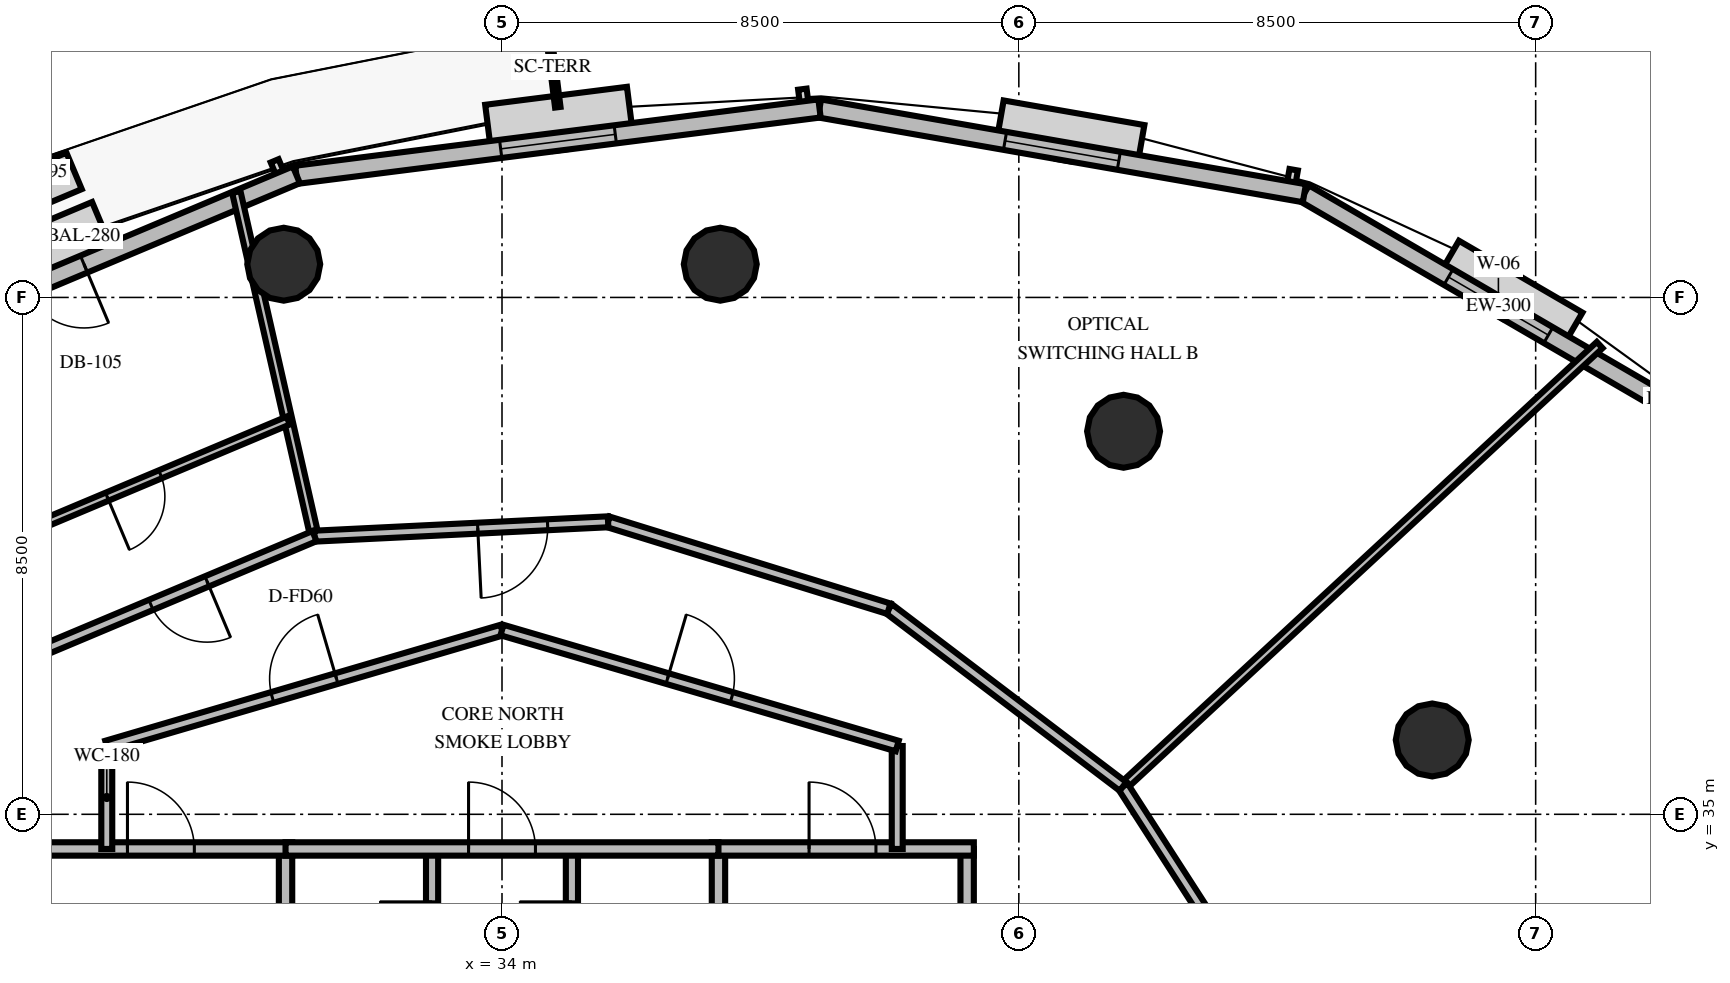
"""IFC4 building model, lengths in metres.
Left out: names, types, materials, properties, quantities, classifications, styles, units other than length and angle.
Written with IfcOpenShell. Run it as: python <this file> out.ifc"""

import sys

from ifc_helpers import new_model, si_unit, direction, frame, frame_2d, origin, origin_2d, place, context, subcontext, project, spatial, rectangle, circle, extrude, element, fill, save


model = new_model("IFC4")
c1 = context("Model", 3, precision=1e-05, world=origin(), true_north=direction((0.0, 1.0)))
c2 = subcontext(c1, "Body", "Model", "MODEL_VIEW")
j1 = project(units=[si_unit("LENGTHUNIT", "METRE"), si_unit("PLANEANGLEUNIT", "RADIAN")], contexts=[c1])
p1 = place(None, origin())
s1 = spatial("IfcSite", under=j1, at=p1, CompositionType="ELEMENT")
p2 = place(p1, origin())
s2 = spatial("IfcBuilding", under=s1, at=p2, CompositionType="ELEMENT")
p3 = place(p2, frame((0.0, 0.0, 129.8)))
s3 = spatial("IfcBuildingStorey", under=s2, at=p3, CompositionType="ELEMENT", Elevation=129.8)
for number, where, z_axis, x_axis in (
    (1, (49.299, 36.222, 0.0), (0.0, 0.0, 1.0), (1.0, 0.0, 0.0)),
    (2, (44.222, 41.299, 0.0), (0.0, 0.0, 1.0), (1.0, 0.0, 0.0)),
    (3, (37.59, 44.046, 0.0), (0.0, 0.0, 1.0), (1.0, 0.0, 0.0)),
    (4, (30.41, 44.046, 0.0), (0.0, 0.0, 1.0), (1.0, 0.0, 0.0)),
):
    element("IfcColumn", number, at=place(p3, frame(where, z_axis=z_axis, x_axis=x_axis)), inside=s3, PredefinedType="COLUMN", context=c2, shape_type="SweptSolid", body=[
        extrude(circle(Radius=0.6, at=origin_2d()), origin(), (0.0, 0.0, 1.0), 4.0),
    ])
p4 = place(p3, frame((53.579, 41.502, 0.0), z_axis=(0.0, 0.0, 1.0), x_axis=(-0.864447367907, 0.502723331585, 0.0)))
e5 = element("IfcWall", 5, at=p4, inside=s3, PredefinedType="SOLIDWALL", context=c2, shape_type="SweptSolid", body=[
    extrude(rectangle(XDim=7.383, YDim=0.3, at=frame_2d((3.691, 0.0))), origin(), (0.0, 0.0, 1.0), 2.9),
])
p5 = place(p4, frame((2.742, 0.0, 0.8)))
e6 = element("IfcOpeningElement", 6, at=p5, cuts=e5, PredefinedType="OPENING", context=c2, shape_type="SweptSolid", body=[
    extrude(rectangle(XDim=1.9, YDim=1.95, at=frame_2d((0.95, 0.975))), frame((0.0, 0.16, 0.0), z_axis=(0.0, -1.0, 0.0), x_axis=(1.0, 0.0, 0.0)), (0.0, 0.0, 1.0), 0.32),
])
p6 = place(p3, frame((47.196, 45.214, 0.0), z_axis=(0.0, 0.0, 1.0), x_axis=(-0.985055293806, 0.172238404964, 0.0)))
e7 = element("IfcWall", 7, at=p6, inside=s3, PredefinedType="SOLIDWALL", context=c2, shape_type="SweptSolid", body=[
    extrude(rectangle(XDim=8.095, YDim=0.3, at=frame_2d((4.048, 0.0))), origin(), (0.0, 0.0, 1.0), 2.9),
])
p7 = place(p6, frame((3.098, 0.0, 0.8)))
e8 = element("IfcOpeningElement", 8, at=p7, cuts=e7, PredefinedType="OPENING", context=c2, shape_type="SweptSolid", body=[
    extrude(rectangle(XDim=1.9, YDim=1.95, at=frame_2d((0.95, 0.975))), frame((0.0, 0.16, 0.0), z_axis=(0.0, -1.0, 0.0), x_axis=(1.0, 0.0, 0.0)), (0.0, 0.0, 1.0), 0.32),
])
p8 = place(p3, frame((39.222, 46.608, 0.0), z_axis=(0.0, 0.0, 1.0), x_axis=(-0.992051922293, -0.12582918372, 0.0)))
e9 = element("IfcWall", 9, at=p8, inside=s3, PredefinedType="SOLIDWALL", context=c2, shape_type="SweptSolid", body=[
    extrude(rectangle(XDim=8.673, YDim=0.3, at=frame_2d((4.336, 0.0))), origin(), (0.0, 0.0, 1.0), 2.9),
])
p9 = place(p8, frame((3.386, 0.0, 0.8)))
e10 = element("IfcOpeningElement", 10, at=p9, cuts=e9, PredefinedType="OPENING", context=c2, shape_type="SweptSolid", body=[
    extrude(rectangle(XDim=1.9, YDim=1.95, at=frame_2d((0.95, 0.975))), frame((0.0, 0.16, 0.0), z_axis=(0.0, -1.0, 0.0), x_axis=(1.0, 0.0, 0.0)), (0.0, 0.0, 1.0), 0.32),
])
p10 = place(p3, frame((30.618, 45.517, 0.0), z_axis=(0.0, 0.0, 1.0), x_axis=(-0.921862650999, -0.387516777305, 0.0)))
e11 = element("IfcWall", 11, at=p10, inside=s3, PredefinedType="SOLIDWALL", context=c2, shape_type="SweptSolid", body=[
    extrude(rectangle(XDim=8.891, YDim=0.3, at=frame_2d((4.445, 0.0))), origin(), (0.0, 0.0, 1.0), 2.9),
])
p11 = place(p10, frame((3.79, 0.0, 0.0)))
e12 = element("IfcOpeningElement", 12, at=p11, cuts=e11, PredefinedType="OPENING", context=c2, shape_type="SweptSolid", body=[
    extrude(rectangle(XDim=1.05, YDim=2.15, at=frame_2d((0.525, 1.075))), frame((0.0, 0.16, 0.0), z_axis=(0.0, -1.0, 0.0), x_axis=(1.0, 0.0, 0.0)), (0.0, 0.0, 1.0), 0.32),
])
p12 = place(p3, frame((30.44, 30.05, 0.0), z_axis=(0.0, 0.0, 1.0), x_axis=(0.0, 1.0, 0.0)))
e13 = element("IfcWall", 13, at=p12, inside=s3, PredefinedType="SOLIDWALL", context=c2, shape_type="SweptSolid", body=[
    extrude(rectangle(XDim=4.38, YDim=0.22, at=frame_2d((2.19, 0.0))), origin(), (0.0, 0.0, 1.0), 2.8),
])
p13 = place(p12, frame((0.8, 0.0, 0.0)))
e14 = element("IfcOpeningElement", 14, at=p13, cuts=e13, PredefinedType="OPENING", context=c2, shape_type="SweptSolid", body=[
    extrude(rectangle(XDim=1.05, YDim=2.1, at=frame_2d((0.525, 1.05))), frame((0.0, 0.12, 0.0), z_axis=(0.0, -1.0, 0.0), x_axis=(1.0, 0.0, 0.0)), (0.0, 0.0, 1.0), 0.24),
])
p14 = place(p3, frame((26.24, 34.43, 0.0), z_axis=(0.0, 0.0, 1.0), x_axis=(1.0, 0.0, 0.0)))
e15 = element("IfcWall", 15, at=p14, inside=s3, PredefinedType="SOLIDWALL", context=c2, shape_type="SweptSolid", body=[
    extrude(rectangle(XDim=4.31, YDim=0.22, at=frame_2d((2.155, 0.0))), origin(), (0.0, 0.0, 1.0), 2.8),
])
p15 = place(p14, frame((1.6, 0.0, 0.0)))
e16 = element("IfcOpeningElement", 16, at=p15, cuts=e15, PredefinedType="OPENING", context=c2, shape_type="SweptSolid", body=[
    extrude(rectangle(XDim=1.1, YDim=2.15, at=frame_2d((0.55, 1.075))), frame((0.0, 0.12, 0.0), z_axis=(0.0, -1.0, 0.0), x_axis=(1.0, 0.0, 0.0)), (0.0, 0.0, 1.0), 0.24),
])
p16 = place(p3, frame((32.85, 30.05, 0.0), z_axis=(0.0, 0.0, 1.0), x_axis=(0.0, 1.0, 0.0)))
e17 = element("IfcWall", 17, at=p16, inside=s3, PredefinedType="SOLIDWALL", context=c2, shape_type="SweptSolid", body=[
    extrude(rectangle(XDim=4.38, YDim=0.2, at=frame_2d((2.19, 0.0))), origin(), (0.0, 0.0, 1.0), 2.8),
])
p17 = place(p16, frame((2.65, 0.0, 0.0)))
e18 = element("IfcOpeningElement", 18, at=p17, cuts=e17, PredefinedType="OPENING", context=c2, shape_type="SweptSolid", body=[
    extrude(rectangle(XDim=0.86, YDim=2.05, at=frame_2d((0.43, 1.025))), frame((0.0, 0.11, 0.0), z_axis=(0.0, -1.0, 0.0), x_axis=(1.0, 0.0, 0.0)), (0.0, 0.0, 1.0), 0.22),
])
p18 = place(p3, frame((37.56, 30.05, 0.0), z_axis=(0.0, 0.0, 1.0), x_axis=(0.0, 1.0, 0.0)))
e19 = element("IfcWall", 19, at=p18, inside=s3, PredefinedType="SOLIDWALL", context=c2, shape_type="SweptSolid", body=[
    extrude(rectangle(XDim=4.38, YDim=0.22, at=frame_2d((2.19, 0.0))), origin(), (0.0, 0.0, 1.0), 2.8),
])
p19 = place(p18, frame((0.8, 0.0, 0.0)))
e20 = element("IfcOpeningElement", 20, at=p19, cuts=e19, PredefinedType="OPENING", context=c2, shape_type="SweptSolid", body=[
    extrude(rectangle(XDim=1.05, YDim=2.1, at=frame_2d((0.525, 1.05))), frame((0.0, 0.12, 0.0), z_axis=(0.0, -1.0, 0.0), x_axis=(1.0, 0.0, 0.0)), (0.0, 0.0, 1.0), 0.24),
])
p20 = place(p3, frame((41.65, 30.05, 0.0), z_axis=(0.0, 0.0, 1.0), x_axis=(0.0, 1.0, 0.0)))
e21 = element("IfcWall", 21, at=p20, inside=s3, PredefinedType="SOLIDWALL", context=c2, shape_type="SweptSolid", body=[
    extrude(rectangle(XDim=4.38, YDim=0.22, at=frame_2d((2.19, 0.0))), origin(), (0.0, 0.0, 1.0), 2.8),
])
p21 = place(p3, frame((37.45, 34.43, 0.0), z_axis=(0.0, 0.0, 1.0), x_axis=(1.0, 0.0, 0.0)))
e22 = element("IfcWall", 22, at=p21, inside=s3, PredefinedType="SOLIDWALL", context=c2, shape_type="SweptSolid", body=[
    extrude(rectangle(XDim=4.31, YDim=0.22, at=frame_2d((2.155, 0.0))), origin(), (0.0, 0.0, 1.0), 2.8),
])
p22 = place(p21, frame((1.6, 0.0, 0.0)))
e23 = element("IfcOpeningElement", 23, at=p22, cuts=e22, PredefinedType="OPENING", context=c2, shape_type="SweptSolid", body=[
    extrude(rectangle(XDim=1.1, YDim=2.15, at=frame_2d((0.55, 1.075))), frame((0.0, 0.12, 0.0), z_axis=(0.0, -1.0, 0.0), x_axis=(1.0, 0.0, 0.0)), (0.0, 0.0, 1.0), 0.24),
])
p23 = place(p3, frame((35.15, 30.05, 0.0), z_axis=(0.0, 0.0, 1.0), x_axis=(0.0, 1.0, 0.0)))
e24 = element("IfcWall", 24, at=p23, inside=s3, PredefinedType="SOLIDWALL", context=c2, shape_type="SweptSolid", body=[
    extrude(rectangle(XDim=4.38, YDim=0.2, at=frame_2d((2.19, 0.0))), origin(), (0.0, 0.0, 1.0), 2.8),
])
p24 = place(p23, frame((2.65, 0.0, 0.0)))
e25 = element("IfcOpeningElement", 25, at=p24, cuts=e24, PredefinedType="OPENING", context=c2, shape_type="SweptSolid", body=[
    extrude(rectangle(XDim=0.86, YDim=2.05, at=frame_2d((0.43, 1.025))), frame((0.0, 0.11, 0.0), z_axis=(0.0, -1.0, 0.0), x_axis=(1.0, 0.0, 0.0)), (0.0, 0.0, 1.0), 0.22),
])
p25 = place(p3, frame((30.44, 34.43, 0.0), z_axis=(0.0, 0.0, 1.0), x_axis=(1.0, 0.0, 0.0)))
e26 = element("IfcWall", 26, at=p25, inside=s3, PredefinedType="SOLIDWALL", context=c2, shape_type="SweptSolid", body=[
    extrude(rectangle(XDim=7.12, YDim=0.22, at=frame_2d((3.56, 0.0))), origin(), (0.0, 0.0, 1.0), 2.8),
])
p26 = place(p25, frame((3.01, 0.0, 0.0)))
e27 = element("IfcOpeningElement", 27, at=p26, cuts=e26, PredefinedType="OPENING", context=c2, shape_type="SweptSolid", body=[
    extrude(rectangle(XDim=1.1, YDim=2.15, at=frame_2d((0.55, 1.075))), frame((0.0, 0.12, 0.0), z_axis=(0.0, -1.0, 0.0), x_axis=(1.0, 0.0, 0.0)), (0.0, 0.0, 1.0), 0.24),
])
for number, where, z_axis, x_axis in (
    (28, (27.5, 34.43, 0.0), (0.0, 0.0, 1.0), (0.0, 1.0, 0.0)),
    (29, (40.5, 36.123, 0.0), (0.0, 0.0, 1.0), (0.0, -1.0, 0.0)),
):
    element("IfcWall", number, at=place(p3, frame(where, z_axis=z_axis, x_axis=x_axis)), inside=s3, PredefinedType="PARTITIONING", context=c2, shape_type="SweptSolid", body=[
        extrude(rectangle(XDim=1.693, YDim=0.18, at=frame_2d((0.846, 0.0))), origin(), (0.0, 0.0, 1.0), 2.8),
    ])
p27 = place(p3, frame((27.5, 36.123, 0.0), z_axis=(0.0, 0.0, 1.0), x_axis=(0.959546654541, 0.281549671923, 0.0)))
e30 = element("IfcWall", 30, at=p27, inside=s3, PredefinedType="PARTITIONING", context=c2, shape_type="SweptSolid", body=[
    extrude(rectangle(XDim=6.774, YDim=0.18, at=frame_2d((3.387, 0.0))), origin(), (0.0, 0.0, 1.0), 2.8),
])
p28 = place(p27, frame((2.837, 0.0, 0.0)))
e31 = element("IfcOpeningElement", 31, at=p28, cuts=e30, PredefinedType="OPENING", context=c2, shape_type="SweptSolid", body=[
    extrude(rectangle(XDim=1.1, YDim=2.15, at=frame_2d((0.55, 1.075))), frame((0.0, 0.1, 0.0), z_axis=(0.0, -1.0, 0.0), x_axis=(1.0, 0.0, 0.0)), (0.0, 0.0, 1.0), 0.2),
])
p29 = place(p3, frame((34.0, 38.03, 0.0), z_axis=(0.0, 0.0, 1.0), x_axis=(0.959546654541, -0.281549671923, 0.0)))
e32 = element("IfcWall", 32, at=p29, inside=s3, PredefinedType="PARTITIONING", context=c2, shape_type="SweptSolid", body=[
    extrude(rectangle(XDim=6.774, YDim=0.18, at=frame_2d((3.387, 0.0))), origin(), (0.0, 0.0, 1.0), 2.8),
])
p30 = place(p29, frame((2.837, 0.0, 0.0)))
e33 = element("IfcOpeningElement", 33, at=p30, cuts=e32, PredefinedType="OPENING", context=c2, shape_type="SweptSolid", body=[
    extrude(rectangle(XDim=1.1, YDim=2.15, at=frame_2d((0.55, 1.075))), frame((0.0, 0.1, 0.0), z_axis=(0.0, -1.0, 0.0), x_axis=(1.0, 0.0, 0.0)), (0.0, 0.0, 1.0), 0.2),
])
p31 = place(p3, frame((44.213, 35.458, 0.0), z_axis=(0.0, 0.0, 1.0), x_axis=(0.733742531986, 0.679427624368, 0.0)))
e34 = element("IfcWall", 34, at=p31, inside=s3, PredefinedType="PARTITIONING", context=c2, shape_type="SweptSolid", body=[
    extrude(rectangle(XDim=10.684, YDim=0.14, at=frame_2d((5.342, 0.0))), origin(), (0.0, 0.0, 1.0), 2.8),
])
p32 = place(p3, frame((46.832, 31.394, 0.0), z_axis=(0.0, 0.0, 1.0), x_axis=(-0.541732258193, 0.840551105188, 0.0)))
e35 = element("IfcWall", 35, at=p32, inside=s3, PredefinedType="PARTITIONING", context=c2, shape_type="SweptSolid", body=[
    extrude(rectangle(XDim=4.834, YDim=0.18, at=frame_2d((2.417, 0.0))), origin(), (0.0, 0.0, 1.0), 2.8),
])
p33 = place(p3, frame((30.916, 39.574, 0.0), z_axis=(0.0, 0.0, 1.0), x_axis=(-0.221533824593, 0.975152687819, 0.0)))
e36 = element("IfcWall", 36, at=p33, inside=s3, PredefinedType="PARTITIONING", context=c2, shape_type="SweptSolid", body=[
    extrude(rectangle(XDim=5.803, YDim=0.14, at=frame_2d((2.902, 0.0))), origin(), (0.0, 0.0, 1.0), 2.8),
])
p34 = place(p3, frame((44.213, 35.458, 0.0), z_axis=(0.0, 0.0, 1.0), x_axis=(-0.796520179577, 0.604611944579, 0.0)))
e37 = element("IfcWall", 37, at=p34, inside=s3, PredefinedType="PARTITIONING", context=c2, shape_type="SweptSolid", body=[
    extrude(rectangle(XDim=4.834, YDim=0.18, at=frame_2d((2.417, 0.0))), origin(), (0.0, 0.0, 1.0), 2.8),
])
p35 = place(p3, frame((40.363, 38.381, 0.0), z_axis=(0.0, 0.0, 1.0), x_axis=(-0.955270945658, 0.295732007706, 0.0)))
e38 = element("IfcWall", 38, at=p35, inside=s3, PredefinedType="PARTITIONING", context=c2, shape_type="SweptSolid", body=[
    extrude(rectangle(XDim=4.834, YDim=0.18, at=frame_2d((2.417, 0.0))), origin(), (0.0, 0.0, 1.0), 2.8),
])
p36 = place(p3, frame((35.745, 39.81, 0.0), z_axis=(0.0, 0.0, 1.0), x_axis=(-0.998806890168, -0.048834374699, 0.0)))
e39 = element("IfcWall", 39, at=p36, inside=s3, PredefinedType="PARTITIONING", context=c2, shape_type="SweptSolid", body=[
    extrude(rectangle(XDim=4.834, YDim=0.18, at=frame_2d((2.417, 0.0))), origin(), (0.0, 0.0, 1.0), 2.8),
])
p37 = place(p36, frame((0.996, 0.0, 0.0)))
e40 = element("IfcOpeningElement", 40, at=p37, cuts=e39, PredefinedType="OPENING", context=c2, shape_type="SweptSolid", body=[
    extrude(rectangle(XDim=1.15, YDim=2.15, at=frame_2d((0.575, 1.075))), frame((0.0, 0.1, 0.0), z_axis=(0.0, -1.0, 0.0), x_axis=(1.0, 0.0, 0.0)), (0.0, 0.0, 1.0), 0.2),
])
p38 = place(p3, frame((30.916, 39.574, 0.0), z_axis=(0.0, 0.0, 1.0), x_axis=(-0.921850072215, -0.387546699582, 0.0)))
e41 = element("IfcWall", 41, at=p38, inside=s3, PredefinedType="PARTITIONING", context=c2, shape_type="SweptSolid", body=[
    extrude(rectangle(XDim=4.834, YDim=0.18, at=frame_2d((2.417, 0.0))), origin(), (0.0, 0.0, 1.0), 2.8),
])
p39 = place(p38, frame((1.917, 0.0, 0.0)))
e42 = element("IfcOpeningElement", 42, at=p39, cuts=e41, PredefinedType="OPENING", context=c2, shape_type="SweptSolid", body=[
    extrude(rectangle(XDim=1.0, YDim=2.15, at=frame_2d((0.5, 1.075))), frame((0.0, 0.1, 0.0), z_axis=(0.0, -1.0, 0.0), x_axis=(1.0, 0.0, 0.0)), (0.0, 0.0, 1.0), 0.2),
])
p40 = place(p3, frame((30.484, 41.476, 0.0), z_axis=(0.0, 0.0, 1.0), x_axis=(-0.92186534913, -0.387510358666, 0.0)))
e43 = element("IfcWall", 43, at=p40, inside=s3, PredefinedType="PARTITIONING", context=c2, shape_type="SweptSolid", body=[
    extrude(rectangle(XDim=5.511, YDim=0.14, at=frame_2d((2.756, 0.0))), origin(), (0.0, 0.0, 1.0), 2.8),
])
p41 = place(p40, frame((2.281, 0.0, 0.0)))
e44 = element("IfcOpeningElement", 44, at=p41, cuts=e43, PredefinedType="OPENING", context=c2, shape_type="SweptSolid", body=[
    extrude(rectangle(XDim=0.95, YDim=2.15, at=frame_2d((0.475, 1.075))), frame((0.0, 0.08, 0.0), z_axis=(0.0, -1.0, 0.0), x_axis=(1.0, 0.0, 0.0)), (0.0, 0.0, 1.0), 0.16),
])
p42 = place(p5, origin())
e45 = element("IfcWindow", 45, at=p42, inside=s3, PartitioningType="SINGLE_PANEL", PredefinedType="WINDOW", context=c2, shape_type="SweptSolid", body=[
    extrude(rectangle(XDim=1.9, YDim=1.95, at=frame_2d((0.95, 0.975))), frame((0.0, 0.03, 0.0), z_axis=(0.0, -1.0, 0.0), x_axis=(1.0, 0.0, 0.0)), (0.0, 0.0, 1.0), 0.06),
])
fill(e6, e45)
p43 = place(p7, origin())
e46 = element("IfcWindow", 46, at=p43, inside=s3, PartitioningType="SINGLE_PANEL", PredefinedType="WINDOW", context=c2, shape_type="SweptSolid", body=[
    extrude(rectangle(XDim=1.9, YDim=1.95, at=frame_2d((0.95, 0.975))), frame((0.0, 0.03, 0.0), z_axis=(0.0, -1.0, 0.0), x_axis=(1.0, 0.0, 0.0)), (0.0, 0.0, 1.0), 0.06),
])
fill(e8, e46)
p44 = place(p9, origin())
e47 = element("IfcWindow", 47, at=p44, inside=s3, PartitioningType="SINGLE_PANEL", PredefinedType="WINDOW", context=c2, shape_type="SweptSolid", body=[
    extrude(rectangle(XDim=1.9, YDim=1.95, at=frame_2d((0.95, 0.975))), frame((0.0, 0.03, 0.0), z_axis=(0.0, -1.0, 0.0), x_axis=(1.0, 0.0, 0.0)), (0.0, 0.0, 1.0), 0.06),
])
fill(e10, e47)
p45 = place(p11, origin())
e48 = element("IfcDoor", 48, at=p45, inside=s3, OperationType="SINGLE_SWING_LEFT", PredefinedType="DOOR", context=c2, shape_type="SweptSolid", body=[
    extrude(rectangle(XDim=1.05, YDim=2.15, at=frame_2d((0.525, 1.075))), frame((0.0, 0.025, 0.0), z_axis=(0.0, -1.0, 0.0), x_axis=(1.0, 0.0, 0.0)), (0.0, 0.0, 1.0), 0.05),
])
fill(e12, e48)
p46 = place(p15, origin())
e49 = element("IfcDoor", 49, at=p46, inside=s3, OperationType="SINGLE_SWING_LEFT", PredefinedType="DOOR", context=c2, shape_type="SweptSolid", body=[
    extrude(rectangle(XDim=1.1, YDim=2.15, at=frame_2d((0.55, 1.075))), frame((0.0, 0.025, 0.0), z_axis=(0.0, -1.0, 0.0), x_axis=(1.0, 0.0, 0.0)), (0.0, 0.0, 1.0), 0.05),
])
fill(e16, e49)
p47 = place(p17, origin())
e50 = element("IfcDoor", 50, at=p47, inside=s3, OperationType="SINGLE_SWING_RIGHT", PredefinedType="TRAPDOOR", context=c2, shape_type="SweptSolid", body=[
    extrude(rectangle(XDim=0.86, YDim=2.05, at=frame_2d((0.43, 1.025))), frame((0.0, 0.025, 0.0), z_axis=(0.0, -1.0, 0.0), x_axis=(1.0, 0.0, 0.0)), (0.0, 0.0, 1.0), 0.05),
])
fill(e18, e50)
p48 = place(p22, origin())
e51 = element("IfcDoor", 51, at=p48, inside=s3, OperationType="SINGLE_SWING_LEFT", PredefinedType="DOOR", context=c2, shape_type="SweptSolid", body=[
    extrude(rectangle(XDim=1.1, YDim=2.15, at=frame_2d((0.55, 1.075))), frame((0.0, 0.025, 0.0), z_axis=(0.0, -1.0, 0.0), x_axis=(1.0, 0.0, 0.0)), (0.0, 0.0, 1.0), 0.05),
])
fill(e23, e51)
p49 = place(p24, origin())
e52 = element("IfcDoor", 52, at=p49, inside=s3, OperationType="SINGLE_SWING_RIGHT", PredefinedType="TRAPDOOR", context=c2, shape_type="SweptSolid", body=[
    extrude(rectangle(XDim=0.86, YDim=2.05, at=frame_2d((0.43, 1.025))), frame((0.0, 0.025, 0.0), z_axis=(0.0, -1.0, 0.0), x_axis=(1.0, 0.0, 0.0)), (0.0, 0.0, 1.0), 0.05),
])
fill(e25, e52)
p50 = place(p26, origin())
e53 = element("IfcDoor", 53, at=p50, inside=s3, OperationType="SINGLE_SWING_LEFT", PredefinedType="DOOR", context=c2, shape_type="SweptSolid", body=[
    extrude(rectangle(XDim=1.1, YDim=2.15, at=frame_2d((0.55, 1.075))), frame((0.0, 0.025, 0.0), z_axis=(0.0, -1.0, 0.0), x_axis=(1.0, 0.0, 0.0)), (0.0, 0.0, 1.0), 0.05),
])
fill(e27, e53)
p51 = place(p28, origin())
e54 = element("IfcDoor", 54, at=p51, inside=s3, OperationType="SINGLE_SWING_RIGHT", PredefinedType="DOOR", context=c2, shape_type="SweptSolid", body=[
    extrude(rectangle(XDim=1.1, YDim=2.15, at=frame_2d((0.55, 1.075))), frame((0.0, 0.025, 0.0), z_axis=(0.0, -1.0, 0.0), x_axis=(1.0, 0.0, 0.0)), (0.0, 0.0, 1.0), 0.05),
])
fill(e31, e54)
p52 = place(p30, origin())
e55 = element("IfcDoor", 55, at=p52, inside=s3, OperationType="SINGLE_SWING_LEFT", PredefinedType="DOOR", context=c2, shape_type="SweptSolid", body=[
    extrude(rectangle(XDim=1.1, YDim=2.15, at=frame_2d((0.55, 1.075))), frame((0.0, 0.025, 0.0), z_axis=(0.0, -1.0, 0.0), x_axis=(1.0, 0.0, 0.0)), (0.0, 0.0, 1.0), 0.05),
])
fill(e33, e55)
p53 = place(p37, origin())
e56 = element("IfcDoor", 56, at=p53, inside=s3, OperationType="SINGLE_SWING_RIGHT", PredefinedType="DOOR", context=c2, shape_type="SweptSolid", body=[
    extrude(rectangle(XDim=1.15, YDim=2.15, at=frame_2d((0.575, 1.075))), frame((0.0, 0.025, 0.0), z_axis=(0.0, -1.0, 0.0), x_axis=(1.0, 0.0, 0.0)), (0.0, 0.0, 1.0), 0.05),
])
fill(e40, e56)
p54 = place(p39, origin())
e57 = element("IfcDoor", 57, at=p54, inside=s3, OperationType="SINGLE_SWING_LEFT", PredefinedType="DOOR", context=c2, shape_type="SweptSolid", body=[
    extrude(rectangle(XDim=1.0, YDim=2.15, at=frame_2d((0.5, 1.075))), frame((0.0, 0.025, 0.0), z_axis=(0.0, -1.0, 0.0), x_axis=(1.0, 0.0, 0.0)), (0.0, 0.0, 1.0), 0.05),
])
fill(e42, e57)
p55 = place(p41, origin())
e58 = element("IfcDoor", 58, at=p55, inside=s3, OperationType="SINGLE_SWING_RIGHT", PredefinedType="DOOR", context=c2, shape_type="SweptSolid", body=[
    extrude(rectangle(XDim=0.95, YDim=2.15, at=frame_2d((0.475, 1.075))), frame((0.0, 0.025, 0.0), z_axis=(0.0, -1.0, 0.0), x_axis=(1.0, 0.0, 0.0)), (0.0, 0.0, 1.0), 0.05),
])
fill(e44, e58)
save(model, sys.argv[1])
